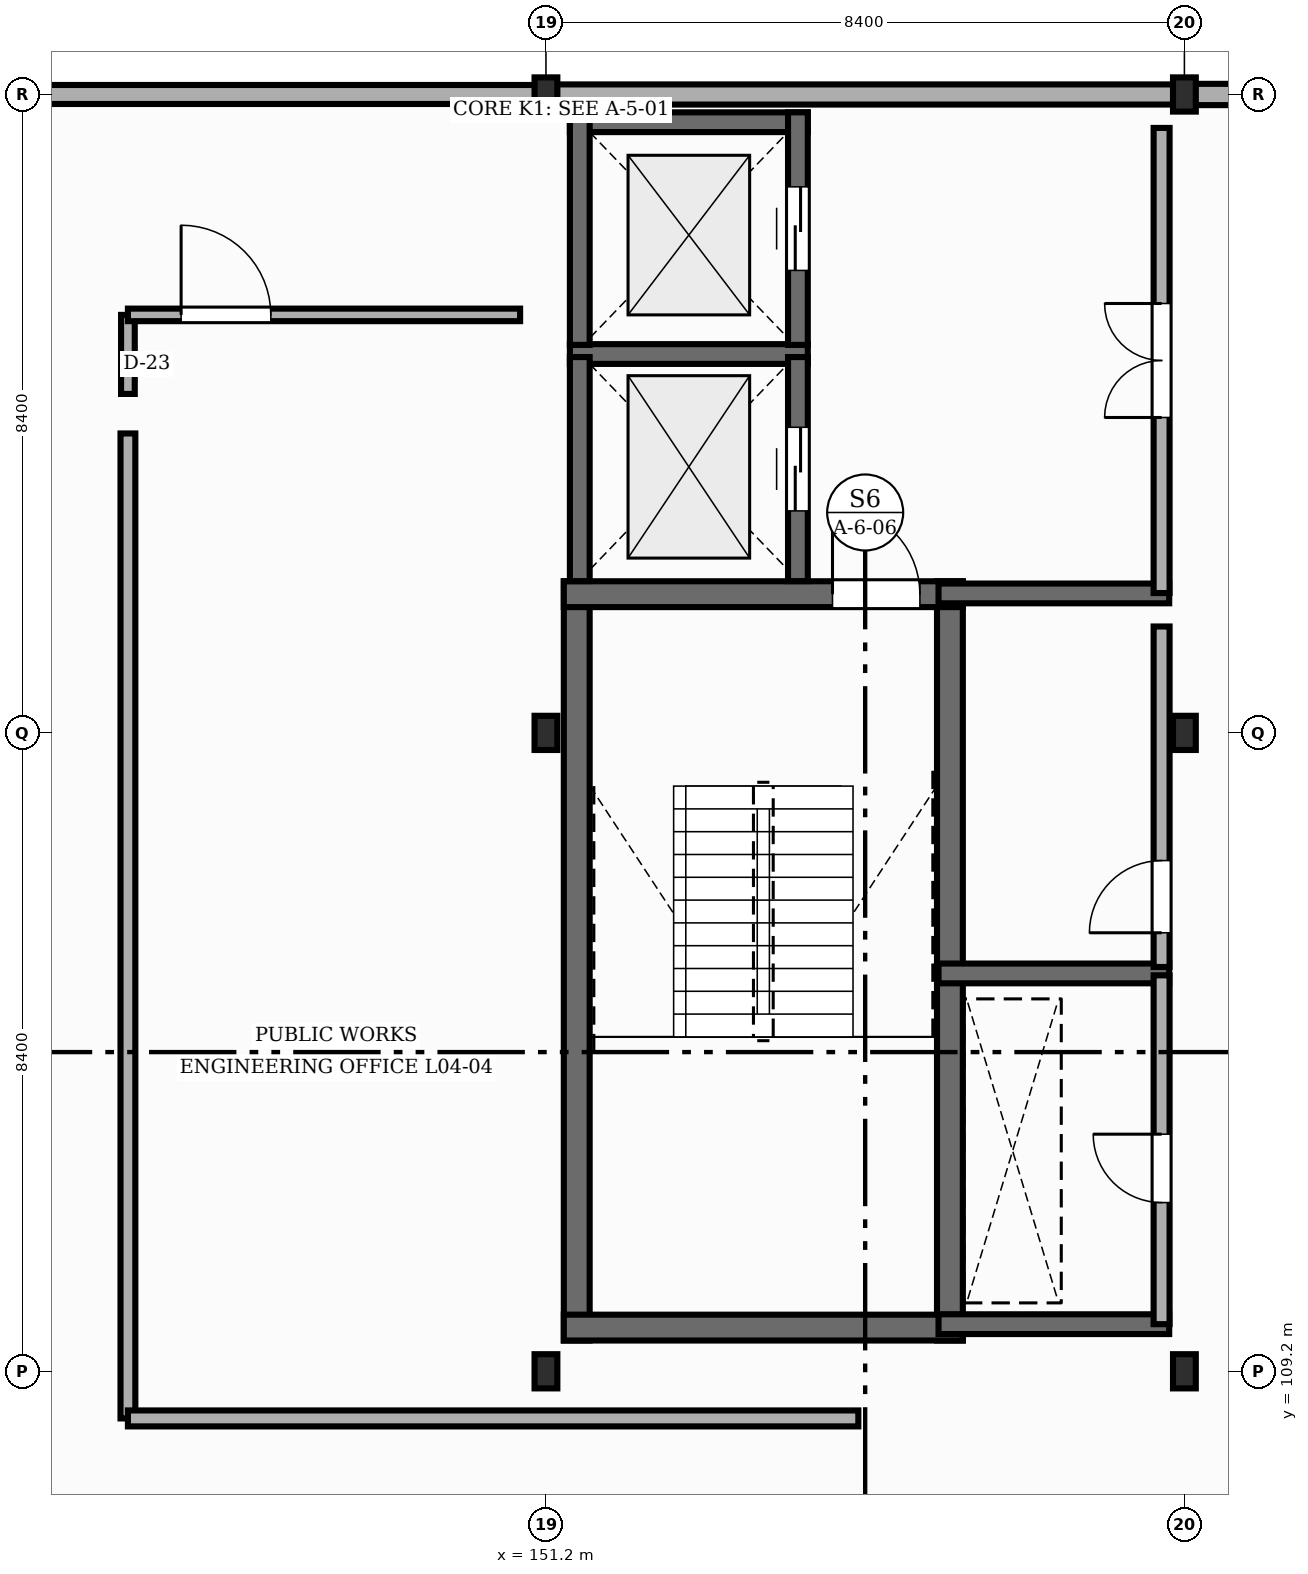
"""IFC4 building model, lengths in metres.
Left out: names, types, materials, properties, quantities, classifications, styles, units other than length and angle.
Written with IfcOpenShell. Run it as: python <this file> out.ifc"""

import sys

from ifc_helpers import new_model, si_unit, direction, frame, frame_2d, origin, origin_2d, place, context, subcontext, project, spatial, rectangle, i_section, extrude, element, fill, save


model = new_model("IFC4")
c1 = context("Model", 3, precision=1e-05, world=origin(), true_north=direction((0.0, 1.0)))
c2 = subcontext(c1, "Body", "Model", "MODEL_VIEW")
j1 = project(units=[si_unit("LENGTHUNIT", "METRE"), si_unit("PLANEANGLEUNIT", "RADIAN")], contexts=[c1])
p1 = place(None, origin())
s1 = spatial("IfcSite", under=j1, at=p1, CompositionType="ELEMENT")
p2 = place(p1, origin())
s2 = spatial("IfcBuilding", under=s1, at=p2, CompositionType="ELEMENT")
p3 = place(p2, frame((0.0, 0.0, 18.0)))
s3 = spatial("IfcBuildingStorey", under=s2, at=p3, CompositionType="ELEMENT", Elevation=18.0)
for number, where, z_axis, x_axis in (
    (1, (151.2, 109.2, 0.0), (0.0, 0.0, 1.0), (1.0, 0.0, 0.0)),
    (2, (151.2, 117.6, 0.0), (0.0, 0.0, 1.0), (1.0, 0.0, 0.0)),
    (3, (151.2, 126.0, 0.0), (0.0, 0.0, 1.0), (1.0, 0.0, 0.0)),
    (4, (159.6, 109.2, 0.0), (0.0, 0.0, 1.0), (1.0, 0.0, 0.0)),
    (5, (159.6, 117.6, 0.0), (0.0, 0.0, 1.0), (1.0, 0.0, 0.0)),
    (6, (159.6, 126.0, 0.0), (0.0, 0.0, 1.0), (1.0, 0.0, 0.0)),
):
    element("IfcColumn", number, at=place(p3, frame(where, z_axis=z_axis, x_axis=x_axis)), inside=s3, PredefinedType="COLUMN", context=c2, shape_type="SweptSolid", body=[
        extrude(i_section(OverallWidth=0.3, OverallDepth=0.45, WebThickness=0.014, FlangeThickness=0.026, FilletRadius=0.027, at=origin_2d()), origin(), (0.0, 0.0, 1.0), 4.05),
    ])
p4 = place(p3, frame((167.992, 126.0, 0.0), z_axis=(0.0, 0.0, 1.0), x_axis=(-1.0, 0.0, 0.0)))
e7 = element("IfcWall", 7, at=p4, inside=s3, PredefinedType="STANDARD", context=c2, shape_type="SweptSolid", body=[
    extrude(rectangle(XDim=8.384, YDim=0.28, at=frame_2d((4.192, 0.0))), origin(), (0.0, 0.0, 1.0), 3.492),
])
p5 = place(p3, frame((159.592, 126.0, 0.0), z_axis=(0.0, 0.0, 1.0), x_axis=(-1.0, 0.0, 0.0)))
e8 = element("IfcWall", 8, at=p5, inside=s3, PredefinedType="STANDARD", context=c2, shape_type="SweptSolid", body=[
    extrude(rectangle(XDim=8.384, YDim=0.265, at=frame_2d((4.192, 0.0))), origin(), (0.0, 0.0, 1.0), 3.522),
])
p6 = place(p3, frame((151.192, 126.0, 0.0), z_axis=(0.0, 0.0, 1.0), x_axis=(-1.0, 0.0, 0.0)))
e9 = element("IfcWall", 9, at=p6, inside=s3, PredefinedType="STANDARD", context=c2, shape_type="SweptSolid", body=[
    extrude(rectangle(XDim=8.384, YDim=0.25, at=frame_2d((4.192, 0.0))), origin(), (0.0, 0.0, 1.0), 3.492),
])
for number, where, z_axis, x_axis in (
    (10, (151.605, 109.605, 0.0), (0.0, 0.0, 1.0), (0.0, 1.0, 0.0)),
    (11, (156.515, 109.605, 0.0), (0.0, 0.0, 1.0), (0.0, 1.0, 0.0)),
):
    element("IfcWall", number, at=place(p3, frame(where, z_axis=z_axis, x_axis=x_axis)), inside=s3, PredefinedType="SHEAR", context=c2, shape_type="SweptSolid", body=[
        extrude(rectangle(XDim=9.99, YDim=0.34, at=frame_2d((4.995, 0.0))), origin(), (0.0, 0.0, 1.0), 3.85),
    ])
p7 = place(p3, frame((151.435, 109.775, 0.0), z_axis=(0.0, 0.0, 1.0), x_axis=(1.0, 0.0, 0.0)))
e12 = element("IfcWall", 12, at=p7, inside=s3, PredefinedType="SHEAR", context=c2, shape_type="SweptSolid", body=[
    extrude(rectangle(XDim=5.25, YDim=0.34, at=frame_2d((2.625, 0.0))), origin(), (0.0, 0.0, 1.0), 3.85),
])
p8 = place(p3, frame((151.435, 119.425, 0.0), z_axis=(0.0, 0.0, 1.0), x_axis=(1.0, 0.0, 0.0)))
e13 = element("IfcWall", 13, at=p8, inside=s3, PredefinedType="SHEAR", context=c2, shape_type="SweptSolid", body=[
    extrude(rectangle(XDim=5.25, YDim=0.34, at=frame_2d((2.625, 0.0))), origin(), (0.0, 0.0, 1.0), 3.85),
])
p9 = place(p8, frame((3.535, 0.0, 0.0)))
e14 = element("IfcOpeningElement", 14, at=p9, cuts=e13, PredefinedType="OPENING", context=c2, shape_type="SweptSolid", body=[
    extrude(rectangle(XDim=1.15, YDim=2.15, at=frame_2d((0.575, 1.075))), frame((0.0, 0.18, 0.0), z_axis=(0.0, -1.0, 0.0), x_axis=(1.0, 0.0, 0.0)), (0.0, 0.0, 1.0), 0.36),
])
p10 = place(p3, frame((151.515, 122.585, 0.0), z_axis=(0.0, 0.0, 1.0), x_axis=(1.0, 0.0, 0.0)))
e15 = element("IfcWall", 15, at=p10, inside=s3, PredefinedType="SHEAR", context=c2, shape_type="SweptSolid", body=[
    extrude(rectangle(XDim=3.13, YDim=0.26, at=frame_2d((1.565, 0.0))), origin(), (0.0, 0.0, 1.0), 3.85),
])
p11 = place(p3, frame((151.645, 119.597, 0.0), z_axis=(0.0, 0.0, 1.0), x_axis=(0.0, 1.0, 0.0)))
e16 = element("IfcWall", 16, at=p11, inside=s3, PredefinedType="SHEAR", context=c2, shape_type="SweptSolid", body=[
    extrude(rectangle(XDim=2.948, YDim=0.26, at=frame_2d((1.474, 0.0))), origin(), (0.0, 0.0, 1.0), 3.85),
])
p12 = place(p3, frame((154.515, 119.597, 0.0), z_axis=(0.0, 0.0, 1.0), x_axis=(0.0, 1.0, 0.0)))
e17 = element("IfcWall", 17, at=p12, inside=s3, PredefinedType="SHEAR", context=c2, shape_type="SweptSolid", body=[
    extrude(rectangle(XDim=2.948, YDim=0.26, at=frame_2d((1.474, 0.0))), origin(), (0.0, 0.0, 1.0), 3.85),
])
p13 = place(p12, frame((0.924, 0.0, 0.0)))
e18 = element("IfcOpeningElement", 18, at=p13, cuts=e17, PredefinedType="OPENING", context=c2, shape_type="SweptSolid", body=[
    extrude(rectangle(XDim=1.1, YDim=2.15, at=frame_2d((0.55, 1.075))), frame((0.0, 0.14, 0.0), z_axis=(0.0, -1.0, 0.0), x_axis=(1.0, 0.0, 0.0)), (0.0, 0.0, 1.0), 0.28),
])
p14 = place(p3, frame((151.515, 125.635, 0.0), z_axis=(0.0, 0.0, 1.0), x_axis=(1.0, 0.0, 0.0)))
e19 = element("IfcWall", 19, at=p14, inside=s3, PredefinedType="SHEAR", context=c2, shape_type="SweptSolid", body=[
    extrude(rectangle(XDim=3.13, YDim=0.26, at=frame_2d((1.565, 0.0))), origin(), (0.0, 0.0, 1.0), 3.85),
])
p15 = place(p3, frame((151.645, 122.705, 0.0), z_axis=(0.0, 0.0, 1.0), x_axis=(0.0, 1.0, 0.0)))
e20 = element("IfcWall", 20, at=p15, inside=s3, PredefinedType="SHEAR", context=c2, shape_type="SweptSolid", body=[
    extrude(rectangle(XDim=3.06, YDim=0.26, at=frame_2d((1.53, 0.0))), origin(), (0.0, 0.0, 1.0), 3.85),
])
p16 = place(p3, frame((154.515, 122.705, 0.0), z_axis=(0.0, 0.0, 1.0), x_axis=(0.0, 1.0, 0.0)))
e21 = element("IfcWall", 21, at=p16, inside=s3, PredefinedType="SHEAR", context=c2, shape_type="SweptSolid", body=[
    extrude(rectangle(XDim=3.06, YDim=0.26, at=frame_2d((1.53, 0.0))), origin(), (0.0, 0.0, 1.0), 3.85),
])
p17 = place(p16, frame((0.98, 0.0, 0.0)))
e22 = element("IfcOpeningElement", 22, at=p17, cuts=e21, PredefinedType="OPENING", context=c2, shape_type="SweptSolid", body=[
    extrude(rectangle(XDim=1.1, YDim=2.15, at=frame_2d((0.55, 1.075))), frame((0.0, 0.14, 0.0), z_axis=(0.0, -1.0, 0.0), x_axis=(1.0, 0.0, 0.0)), (0.0, 0.0, 1.0), 0.28),
])
for number, where, z_axis, x_axis in (
    (23, (156.365, 109.82, 0.0), (0.0, 0.0, 1.0), (1.0, 0.0, 0.0)),
    (24, (156.365, 114.435, 0.0), (0.0, 0.0, 1.0), (1.0, 0.0, 0.0)),
    (25, (156.365, 119.435, 0.0), (0.0, 0.0, 1.0), (1.0, 0.0, 0.0)),
):
    element("IfcWall", number, at=place(p3, frame(where, z_axis=z_axis, x_axis=x_axis)), inside=s3, PredefinedType="SHEAR", context=c2, shape_type="SweptSolid", body=[
        extrude(rectangle(XDim=3.035, YDim=0.26, at=frame_2d((1.518, 0.0))), origin(), (0.0, 0.0, 1.0), 3.85),
    ])
p18 = place(p3, frame((159.3, 109.82, 0.0), z_axis=(0.0, 0.0, 1.0), x_axis=(0.0, 1.0, 0.0)))
e26 = element("IfcWall", 26, at=p18, inside=s3, PredefinedType="STANDARD", context=c2, shape_type="SweptSolid", body=[
    extrude(rectangle(XDim=4.59, YDim=0.21, at=frame_2d((2.295, 0.0))), origin(), (0.0, 0.0, 1.0), 3.502),
])
p19 = place(p18, frame((1.6, 0.0, 0.0)))
e27 = element("IfcOpeningElement", 27, at=p19, cuts=e26, PredefinedType="OPENING", context=c2, shape_type="SweptSolid", body=[
    extrude(rectangle(XDim=0.9, YDim=2.1, at=frame_2d((0.45, 1.05))), frame((0.0, 0.115, 0.0), z_axis=(0.0, -1.0, 0.0), x_axis=(1.0, 0.0, 0.0)), (0.0, 0.0, 1.0), 0.23),
])
p20 = place(p3, frame((159.3, 114.52, 0.0), z_axis=(0.0, 0.0, 1.0), x_axis=(0.0, 1.0, 0.0)))
e28 = element("IfcWall", 28, at=p20, inside=s3, PredefinedType="STANDARD", context=c2, shape_type="SweptSolid", body=[
    extrude(rectangle(XDim=4.48, YDim=0.21, at=frame_2d((2.24, 0.0))), origin(), (0.0, 0.0, 1.0), 3.502),
])
p21 = place(p20, frame((0.45, 0.0, 0.0)))
e29 = element("IfcOpeningElement", 29, at=p21, cuts=e28, PredefinedType="OPENING", context=c2, shape_type="SweptSolid", body=[
    extrude(rectangle(XDim=0.95, YDim=2.15, at=frame_2d((0.475, 1.075))), frame((0.0, 0.115, 0.0), z_axis=(0.0, -1.0, 0.0), x_axis=(1.0, 0.0, 0.0)), (0.0, 0.0, 1.0), 0.23),
])
p22 = place(p3, frame((159.3, 119.44, 0.0), z_axis=(0.0, 0.0, 1.0), x_axis=(0.0, 1.0, 0.0)))
e30 = element("IfcWall", 30, at=p22, inside=s3, PredefinedType="STANDARD", context=c2, shape_type="SweptSolid", body=[
    extrude(rectangle(XDim=6.12, YDim=0.21, at=frame_2d((3.06, 0.0))), origin(), (0.0, 0.0, 1.0), 3.542),
])
p23 = place(p22, frame((2.31, 0.0, 0.0)))
e31 = element("IfcOpeningElement", 31, at=p23, cuts=e30, PredefinedType="OPENING", context=c2, shape_type="SweptSolid", body=[
    extrude(rectangle(XDim=1.5, YDim=2.2, at=frame_2d((0.75, 1.1))), frame((0.0, 0.115, 0.0), z_axis=(0.0, -1.0, 0.0), x_axis=(1.0, 0.0, 0.0)), (0.0, 0.0, 1.0), 0.23),
])
p24 = place(p3, frame((145.7, 108.58, -0.004), z_axis=(0.0, 0.0, 1.0), x_axis=(0.0, 1.0, 0.0)))
e32 = element("IfcWall", 32, at=p24, inside=s3, PredefinedType="STANDARD", context=c2, shape_type="SweptSolid", body=[
    extrude(rectangle(XDim=12.96, YDim=0.195, at=frame_2d((6.48, 0.0))), origin(), (0.0, 0.0, 1.0), 3.556),
])
p25 = place(p3, frame((145.7, 122.06, -0.004), z_axis=(0.0, 0.0, 1.0), x_axis=(0.0, 1.0, 0.0)))
e33 = element("IfcWall", 33, at=p25, inside=s3, PredefinedType="STANDARD", context=c2, shape_type="SweptSolid", body=[
    extrude(rectangle(XDim=1.04, YDim=0.18, at=frame_2d((0.52, 0.0))), origin(), (0.0, 0.0, 1.0), 3.586),
])
p26 = place(p3, frame((145.7, 123.1, -0.004), z_axis=(0.0, 0.0, 1.0), x_axis=(1.0, 0.0, 0.0)))
e34 = element("IfcWall", 34, at=p26, inside=s3, PredefinedType="STANDARD", context=c2, shape_type="SweptSolid", body=[
    extrude(rectangle(XDim=5.16, YDim=0.165, at=frame_2d((2.58, 0.0))), origin(), (0.0, 0.0, 1.0), 3.854),
])
p27 = place(p26, frame((0.7, 0.0, 0.0)))
e35 = element("IfcOpeningElement", 35, at=p27, cuts=e34, PredefinedType="OPENING", context=c2, shape_type="SweptSolid", body=[
    extrude(rectangle(XDim=1.18, YDim=2.22, at=frame_2d((0.59, 1.11))), frame((0.0, 0.093, 0.0), z_axis=(0.0, -1.0, 0.0), x_axis=(1.0, 0.0, 0.0)), (0.0, 0.0, 1.0), 0.185),
])
p28 = place(p3, frame((155.31, 108.58, -0.004), z_axis=(0.0, 0.0, 1.0), x_axis=(-1.0, 0.0, 0.0)))
e36 = element("IfcWall", 36, at=p28, inside=s3, PredefinedType="STANDARD", context=c2, shape_type="SweptSolid", body=[
    extrude(rectangle(XDim=9.61, YDim=0.21, at=frame_2d((4.805, 0.0))), origin(), (0.0, 0.0, 1.0), 3.854),
])
p29 = place(p9, origin())
e37 = element("IfcDoor", 37, at=p29, inside=s3, OperationType="SINGLE_SWING_LEFT", PredefinedType="DOOR", context=c2, shape_type="SweptSolid", body=[
    extrude(rectangle(XDim=1.15, YDim=2.15, at=frame_2d((0.575, 1.075))), frame((0.0, 0.025, 0.0), z_axis=(0.0, -1.0, 0.0), x_axis=(1.0, 0.0, 0.0)), (0.0, 0.0, 1.0), 0.05),
])
fill(e14, e37)
p30 = place(p13, origin())
e38 = element("IfcDoor", 38, at=p30, inside=s3, OperationType="DOUBLE_DOOR_SLIDING", PredefinedType="DOOR", context=c2, shape_type="SweptSolid", body=[
    extrude(rectangle(XDim=1.1, YDim=2.15, at=frame_2d((0.55, 1.075))), frame((0.0, 0.025, 0.0), z_axis=(0.0, -1.0, 0.0), x_axis=(1.0, 0.0, 0.0)), (0.0, 0.0, 1.0), 0.05),
])
fill(e18, e38)
p31 = place(p17, origin())
e39 = element("IfcDoor", 39, at=p31, inside=s3, OperationType="DOUBLE_DOOR_SLIDING", PredefinedType="DOOR", context=c2, shape_type="SweptSolid", body=[
    extrude(rectangle(XDim=1.1, YDim=2.15, at=frame_2d((0.55, 1.075))), frame((0.0, 0.025, 0.0), z_axis=(0.0, -1.0, 0.0), x_axis=(1.0, 0.0, 0.0)), (0.0, 0.0, 1.0), 0.05),
])
fill(e22, e39)
p32 = place(p19, origin())
e40 = element("IfcDoor", 40, at=p32, inside=s3, OperationType="SINGLE_SWING_RIGHT", PredefinedType="DOOR", context=c2, shape_type="SweptSolid", body=[
    extrude(rectangle(XDim=0.9, YDim=2.1, at=frame_2d((0.45, 1.05))), frame((0.0, 0.025, 0.0), z_axis=(0.0, -1.0, 0.0), x_axis=(1.0, 0.0, 0.0)), (0.0, 0.0, 1.0), 0.05),
])
fill(e27, e40)
p33 = place(p21, origin())
e41 = element("IfcDoor", 41, at=p33, inside=s3, OperationType="SINGLE_SWING_LEFT", PredefinedType="DOOR", context=c2, shape_type="SweptSolid", body=[
    extrude(rectangle(XDim=0.95, YDim=2.15, at=frame_2d((0.475, 1.075))), frame((0.0, 0.025, 0.0), z_axis=(0.0, -1.0, 0.0), x_axis=(1.0, 0.0, 0.0)), (0.0, 0.0, 1.0), 0.05),
])
fill(e29, e41)
p34 = place(p23, origin())
e42 = element("IfcDoor", 42, at=p34, inside=s3, OperationType="DOUBLE_DOOR_SINGLE_SWING", PredefinedType="DOOR", context=c2, shape_type="SweptSolid", body=[
    extrude(rectangle(XDim=1.5, YDim=2.2, at=frame_2d((0.75, 1.1))), frame((0.0, 0.025, 0.0), z_axis=(0.0, -1.0, 0.0), x_axis=(1.0, 0.0, 0.0)), (0.0, 0.0, 1.0), 0.05),
])
fill(e31, e42)
p35 = place(p27, origin())
e43 = element("IfcDoor", 43, at=p35, inside=s3, OperationType="SINGLE_SWING_LEFT", PredefinedType="DOOR", context=c2, shape_type="SweptSolid", body=[
    extrude(rectangle(XDim=1.18, YDim=2.22, at=frame_2d((0.59, 1.11))), frame((0.0, 0.025, 0.0), z_axis=(0.0, -1.0, 0.0), x_axis=(1.0, 0.0, 0.0)), (0.0, 0.0, 1.0), 0.05),
])
fill(e35, e43)
save(model, sys.argv[1])
